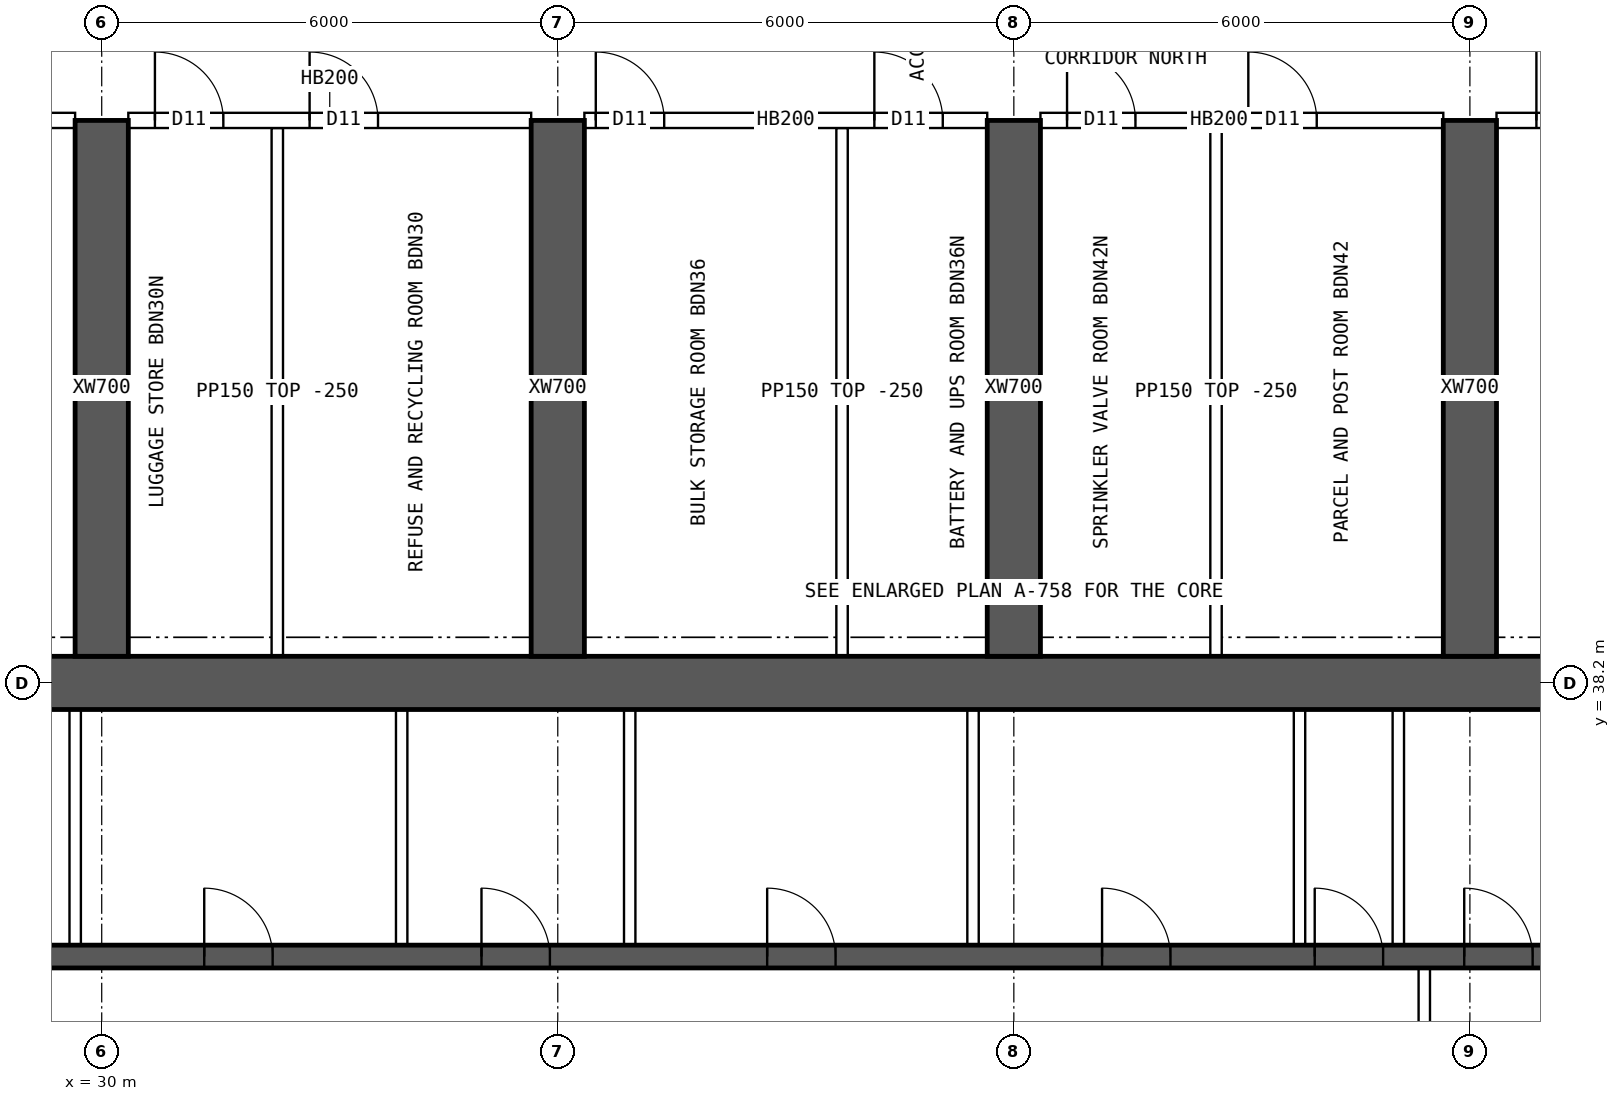
"""IFC4 building model, lengths in metres.
Left out: names, types, materials, properties, quantities, classifications, styles, units other than length and angle.
Written with IfcOpenShell. Run it as: python <this file> out.ifc"""

import sys

from ifc_helpers import new_model, si_unit, direction, frame, frame_2d, origin, place, context, subcontext, project, spatial, rectangle, extrude, element, fill, save


model = new_model("IFC4")
c1 = context("Model", 3, precision=1e-05, world=origin(), true_north=direction((0.0, 1.0)))
c2 = subcontext(c1, "Body", "Model", "MODEL_VIEW")
j1 = project(units=[si_unit("LENGTHUNIT", "METRE"), si_unit("PLANEANGLEUNIT", "RADIAN")], contexts=[c1])
p1 = place(None, origin())
s1 = spatial("IfcSite", under=j1, at=p1, CompositionType="ELEMENT")
p2 = place(p1, origin())
s2 = spatial("IfcBuilding", under=s1, at=p2, CompositionType="ELEMENT")
p3 = place(p2, frame((0.0, 0.0, 224.05)))
s3 = spatial("IfcBuildingStorey", under=s2, at=p3, CompositionType="ELEMENT", Elevation=224.05)
p4 = place(p3, frame((18.0, 38.2, 0.0), z_axis=(0.0, 0.0, 1.0), x_axis=(1.0, 0.0, 0.0)))
e1 = element("IfcWall", 1, at=p4, inside=s3, PredefinedType="SHEAR", context=c2, shape_type="SweptSolid", body=[
    extrude(rectangle(XDim=48.0, YDim=0.7, at=frame_2d((24.0, 0.0))), origin(), (0.0, 0.0, 1.0), 3.75),
])
p5 = place(p3, frame((18.35, 34.6, 0.0), z_axis=(0.0, 0.0, 1.0), x_axis=(1.0, 0.0, 0.0)))
e2 = element("IfcWall", 2, at=p5, inside=s3, PredefinedType="SHEAR", context=c2, shape_type="SweptSolid", body=[
    extrude(rectangle(XDim=47.3, YDim=0.3, at=frame_2d((23.65, 0.0))), origin(), (0.0, 0.0, 1.0), 3.75),
])
p6 = place(p5, frame((0.9, 0.0, 0.0)))
e3 = element("IfcOpeningElement", 3, at=p6, cuts=e2, PredefinedType="OPENING", context=c2, shape_type="SweptSolid", body=[
    extrude(rectangle(XDim=1.1, YDim=2.1, at=frame_2d((0.55, 1.05))), frame((0.0, 0.16, 0.0), z_axis=(0.0, -1.0, 0.0), x_axis=(1.0, 0.0, 0.0)), (0.0, 0.0, 1.0), 0.32),
])
p7 = place(p5, frame((45.3, 0.0, 0.0)))
e4 = element("IfcOpeningElement", 4, at=p7, cuts=e2, PredefinedType="OPENING", context=c2, shape_type="SweptSolid", body=[
    extrude(rectangle(XDim=1.1, YDim=2.1, at=frame_2d((0.55, 1.05))), frame((0.0, 0.16, 0.0), z_axis=(0.0, -1.0, 0.0), x_axis=(1.0, 0.0, 0.0)), (0.0, 0.0, 1.0), 0.32),
])
p8 = place(p5, frame((4.25, 0.0, 0.0)))
e5 = element("IfcOpeningElement", 5, at=p8, cuts=e2, PredefinedType="OPENING", context=c2, shape_type="SweptSolid", body=[
    extrude(rectangle(XDim=0.9, YDim=2.1, at=frame_2d((0.45, 1.05))), frame((0.0, 0.16, 0.0), z_axis=(0.0, -1.0, 0.0), x_axis=(1.0, 0.0, 0.0)), (0.0, 0.0, 1.0), 0.32),
])
p9 = place(p5, frame((42.15, 0.0, 0.0)))
e6 = element("IfcOpeningElement", 6, at=p9, cuts=e2, PredefinedType="OPENING", context=c2, shape_type="SweptSolid", body=[
    extrude(rectangle(XDim=0.9, YDim=2.1, at=frame_2d((0.45, 1.05))), frame((0.0, 0.16, 0.0), z_axis=(0.0, -1.0, 0.0), x_axis=(1.0, 0.0, 0.0)), (0.0, 0.0, 1.0), 0.32),
])
p10 = place(p5, frame((9.025, 0.0, 0.0)))
e7 = element("IfcOpeningElement", 7, at=p10, cuts=e2, PredefinedType="OPENING", context=c2, shape_type="SweptSolid", body=[
    extrude(rectangle(XDim=0.9, YDim=2.1, at=frame_2d((0.45, 1.05))), frame((0.0, 0.16, 0.0), z_axis=(0.0, -1.0, 0.0), x_axis=(1.0, 0.0, 0.0)), (0.0, 0.0, 1.0), 0.32),
])
p11 = place(p5, frame((12.999, 0.0, 0.0)))
e8 = element("IfcOpeningElement", 8, at=p11, cuts=e2, PredefinedType="OPENING", context=c2, shape_type="SweptSolid", body=[
    extrude(rectangle(XDim=0.9, YDim=2.1, at=frame_2d((0.45, 1.05))), frame((0.0, 0.16, 0.0), z_axis=(0.0, -1.0, 0.0), x_axis=(1.0, 0.0, 0.0)), (0.0, 0.0, 1.0), 0.32),
])
p12 = place(p5, frame((16.646, 0.0, 0.0)))
e9 = element("IfcOpeningElement", 9, at=p12, cuts=e2, PredefinedType="OPENING", context=c2, shape_type="SweptSolid", body=[
    extrude(rectangle(XDim=0.9, YDim=2.1, at=frame_2d((0.45, 1.05))), frame((0.0, 0.16, 0.0), z_axis=(0.0, -1.0, 0.0), x_axis=(1.0, 0.0, 0.0)), (0.0, 0.0, 1.0), 0.32),
])
p13 = place(p5, frame((20.405, 0.0, 0.0)))
e10 = element("IfcOpeningElement", 10, at=p13, cuts=e2, PredefinedType="OPENING", context=c2, shape_type="SweptSolid", body=[
    extrude(rectangle(XDim=0.9, YDim=2.1, at=frame_2d((0.45, 1.05))), frame((0.0, 0.16, 0.0), z_axis=(0.0, -1.0, 0.0), x_axis=(1.0, 0.0, 0.0)), (0.0, 0.0, 1.0), 0.32),
])
p14 = place(p5, frame((24.811, 0.0, 0.0)))
e11 = element("IfcOpeningElement", 11, at=p14, cuts=e2, PredefinedType="OPENING", context=c2, shape_type="SweptSolid", body=[
    extrude(rectangle(XDim=0.9, YDim=2.1, at=frame_2d((0.45, 1.05))), frame((0.0, 0.16, 0.0), z_axis=(0.0, -1.0, 0.0), x_axis=(1.0, 0.0, 0.0)), (0.0, 0.0, 1.0), 0.32),
])
p15 = place(p5, frame((27.608, 0.0, 0.0)))
e12 = element("IfcOpeningElement", 12, at=p15, cuts=e2, PredefinedType="OPENING", context=c2, shape_type="SweptSolid", body=[
    extrude(rectangle(XDim=0.9, YDim=2.1, at=frame_2d((0.45, 1.05))), frame((0.0, 0.16, 0.0), z_axis=(0.0, -1.0, 0.0), x_axis=(1.0, 0.0, 0.0)), (0.0, 0.0, 1.0), 0.32),
])
p16 = place(p5, frame((29.575, 0.0, 0.0)))
e13 = element("IfcOpeningElement", 13, at=p16, cuts=e2, PredefinedType="OPENING", context=c2, shape_type="SweptSolid", body=[
    extrude(rectangle(XDim=0.9, YDim=2.1, at=frame_2d((0.45, 1.05))), frame((0.0, 0.16, 0.0), z_axis=(0.0, -1.0, 0.0), x_axis=(1.0, 0.0, 0.0)), (0.0, 0.0, 1.0), 0.32),
])
p17 = place(p5, frame((32.007, 0.0, 0.0)))
e14 = element("IfcOpeningElement", 14, at=p17, cuts=e2, PredefinedType="OPENING", context=c2, shape_type="SweptSolid", body=[
    extrude(rectangle(XDim=0.9, YDim=2.1, at=frame_2d((0.45, 1.05))), frame((0.0, 0.16, 0.0), z_axis=(0.0, -1.0, 0.0), x_axis=(1.0, 0.0, 0.0)), (0.0, 0.0, 1.0), 0.32),
])
p18 = place(p5, frame((34.742, 0.0, 0.0)))
e15 = element("IfcOpeningElement", 15, at=p18, cuts=e2, PredefinedType="OPENING", context=c2, shape_type="SweptSolid", body=[
    extrude(rectangle(XDim=0.9, YDim=2.1, at=frame_2d((0.45, 1.05))), frame((0.0, 0.16, 0.0), z_axis=(0.0, -1.0, 0.0), x_axis=(1.0, 0.0, 0.0)), (0.0, 0.0, 1.0), 0.32),
])
p19 = place(p5, frame((37.781, 0.0, 0.0)))
e16 = element("IfcOpeningElement", 16, at=p19, cuts=e2, PredefinedType="OPENING", context=c2, shape_type="SweptSolid", body=[
    extrude(rectangle(XDim=0.9, YDim=2.1, at=frame_2d((0.45, 1.05))), frame((0.0, 0.16, 0.0), z_axis=(0.0, -1.0, 0.0), x_axis=(1.0, 0.0, 0.0)), (0.0, 0.0, 1.0), 0.32),
])
for number, where, z_axis, x_axis in (
    (17, (30.0, 38.55, 0.0), (0.0, 0.0, 1.0), (0.0, 1.0, 0.0)),
    (18, (36.0, 38.55, 0.0), (0.0, 0.0, 1.0), (0.0, 1.0, 0.0)),
    (19, (42.0, 38.55, 0.0), (0.0, 0.0, 1.0), (0.0, 1.0, 0.0)),
    (20, (48.0, 38.55, 0.0), (0.0, 0.0, 1.0), (0.0, 1.0, 0.0)),
):
    element("IfcWall", number, at=place(p3, frame(where, z_axis=z_axis, x_axis=x_axis)), inside=s3, PredefinedType="SHEAR", context=c2, shape_type="SweptSolid", body=[
        extrude(rectangle(XDim=7.05, YDim=0.7, at=frame_2d((3.525, 0.0))), origin(), (0.0, 0.0, 1.0), 3.75),
    ])
p20 = place(p3, frame((47.4, 30.55, 0.0), z_axis=(0.0, 0.0, 1.0), x_axis=(0.0, 1.0, 0.0)))
e21 = element("IfcWall", 21, at=p20, inside=s3, PredefinedType="SOLIDWALL", context=c2, shape_type="SweptSolid", body=[
    extrude(rectangle(XDim=3.9, YDim=0.15, at=frame_2d((1.95, 0.0))), origin(), (0.0, 0.0, 1.0), 3.5),
])
p21 = place(p20, frame((1.15, 0.0, 0.0)))
e22 = element("IfcOpeningElement", 22, at=p21, cuts=e21, PredefinedType="OPENING", context=c2, shape_type="SweptSolid", body=[
    extrude(rectangle(XDim=1.6, YDim=2.1, at=frame_2d((0.8, 1.05))), frame((0.0, 0.085, 0.0), z_axis=(0.0, -1.0, 0.0), x_axis=(1.0, 0.0, 0.0)), (0.0, 0.0, 1.0), 0.17),
])
for number, where, z_axis, x_axis in (
    (23, (29.651, 34.75, 0.0), (0.0, 0.0, 1.0), (0.0, 1.0, 0.0)),
    (24, (33.946, 34.75, 0.0), (0.0, 0.0, 1.0), (0.0, 1.0, 0.0)),
    (25, (36.946, 34.75, 0.0), (0.0, 0.0, 1.0), (0.0, 1.0, 0.0)),
    (26, (41.463, 34.75, 0.0), (0.0, 0.0, 1.0), (0.0, 1.0, 0.0)),
    (27, (45.758, 34.75, 0.0), (0.0, 0.0, 1.0), (0.0, 1.0, 0.0)),
    (28, (47.058, 34.75, 0.0), (0.0, 0.0, 1.0), (0.0, 1.0, 0.0)),
):
    element("IfcWall", number, at=place(p3, frame(where, z_axis=z_axis, x_axis=x_axis)), inside=s3, PredefinedType="SOLIDWALL", context=c2, shape_type="SweptSolid", body=[
        extrude(rectangle(XDim=3.1, YDim=0.15, at=frame_2d((1.55, 0.0))), origin(), (0.0, 0.0, 1.0), 3.5),
    ])
p22 = place(p3, frame((24.35, 45.6, 0.0), z_axis=(0.0, 0.0, 1.0), x_axis=(1.0, 0.0, 0.0)))
e29 = element("IfcWall", 29, at=p22, inside=s3, PredefinedType="SOLIDWALL", context=c2, shape_type="SweptSolid", body=[
    extrude(rectangle(XDim=5.3, YDim=0.2, at=frame_2d((2.65, 0.0))), origin(), (0.0, 0.0, 1.0), 3.5),
])
p23 = place(p22, frame((0.525, 0.0, 0.0)))
e30 = element("IfcOpeningElement", 30, at=p23, cuts=e29, PredefinedType="OPENING", context=c2, shape_type="SweptSolid", body=[
    extrude(rectangle(XDim=1.0, YDim=2.1, at=frame_2d((0.5, 1.05))), frame((0.0, 0.11, 0.0), z_axis=(0.0, -1.0, 0.0), x_axis=(1.0, 0.0, 0.0)), (0.0, 0.0, 1.0), 0.22),
])
p24 = place(p3, frame((30.35, 45.6, 0.0), z_axis=(0.0, 0.0, 1.0), x_axis=(1.0, 0.0, 0.0)))
e31 = element("IfcWall", 31, at=p24, inside=s3, PredefinedType="SOLIDWALL", context=c2, shape_type="SweptSolid", body=[
    extrude(rectangle(XDim=5.3, YDim=0.2, at=frame_2d((2.65, 0.0))), origin(), (0.0, 0.0, 1.0), 3.5),
])
p25 = place(p24, frame((0.35, 0.0, 0.0)))
e32 = element("IfcOpeningElement", 32, at=p25, cuts=e31, PredefinedType="OPENING", context=c2, shape_type="SweptSolid", body=[
    extrude(rectangle(XDim=0.9, YDim=2.1, at=frame_2d((0.45, 1.05))), frame((0.0, 0.11, 0.0), z_axis=(0.0, -1.0, 0.0), x_axis=(1.0, 0.0, 0.0)), (0.0, 0.0, 1.0), 0.22),
])
p26 = place(p24, frame((2.385, 0.0, 0.0)))
e33 = element("IfcOpeningElement", 33, at=p26, cuts=e31, PredefinedType="OPENING", context=c2, shape_type="SweptSolid", body=[
    extrude(rectangle(XDim=0.9, YDim=2.1, at=frame_2d((0.45, 1.05))), frame((0.0, 0.11, 0.0), z_axis=(0.0, -1.0, 0.0), x_axis=(1.0, 0.0, 0.0)), (0.0, 0.0, 1.0), 0.22),
])
p27 = place(p3, frame((36.35, 45.6, 0.0), z_axis=(0.0, 0.0, 1.0), x_axis=(1.0, 0.0, 0.0)))
e34 = element("IfcWall", 34, at=p27, inside=s3, PredefinedType="SOLIDWALL", context=c2, shape_type="SweptSolid", body=[
    extrude(rectangle(XDim=5.3, YDim=0.2, at=frame_2d((2.65, 0.0))), origin(), (0.0, 0.0, 1.0), 3.5),
])
p28 = place(p27, frame((0.15, 0.0, 0.0)))
e35 = element("IfcOpeningElement", 35, at=p28, cuts=e34, PredefinedType="OPENING", context=c2, shape_type="SweptSolid", body=[
    extrude(rectangle(XDim=0.9, YDim=2.1, at=frame_2d((0.45, 1.05))), frame((0.0, 0.11, 0.0), z_axis=(0.0, -1.0, 0.0), x_axis=(1.0, 0.0, 0.0)), (0.0, 0.0, 1.0), 0.22),
])
p29 = place(p27, frame((3.815, 0.0, 0.0)))
e36 = element("IfcOpeningElement", 36, at=p29, cuts=e34, PredefinedType="OPENING", context=c2, shape_type="SweptSolid", body=[
    extrude(rectangle(XDim=0.9, YDim=2.1, at=frame_2d((0.45, 1.05))), frame((0.0, 0.11, 0.0), z_axis=(0.0, -1.0, 0.0), x_axis=(1.0, 0.0, 0.0)), (0.0, 0.0, 1.0), 0.22),
])
p30 = place(p3, frame((42.35, 45.6, 0.0), z_axis=(0.0, 0.0, 1.0), x_axis=(1.0, 0.0, 0.0)))
e37 = element("IfcWall", 37, at=p30, inside=s3, PredefinedType="SOLIDWALL", context=c2, shape_type="SweptSolid", body=[
    extrude(rectangle(XDim=5.3, YDim=0.2, at=frame_2d((2.65, 0.0))), origin(), (0.0, 0.0, 1.0), 3.5),
])
p31 = place(p30, frame((0.35, 0.0, 0.0)))
e38 = element("IfcOpeningElement", 38, at=p31, cuts=e37, PredefinedType="OPENING", context=c2, shape_type="SweptSolid", body=[
    extrude(rectangle(XDim=0.9, YDim=2.1, at=frame_2d((0.45, 1.05))), frame((0.0, 0.11, 0.0), z_axis=(0.0, -1.0, 0.0), x_axis=(1.0, 0.0, 0.0)), (0.0, 0.0, 1.0), 0.22),
])
p32 = place(p30, frame((2.735, 0.0, 0.0)))
e39 = element("IfcOpeningElement", 39, at=p32, cuts=e37, PredefinedType="OPENING", context=c2, shape_type="SweptSolid", body=[
    extrude(rectangle(XDim=0.9, YDim=2.1, at=frame_2d((0.45, 1.05))), frame((0.0, 0.11, 0.0), z_axis=(0.0, -1.0, 0.0), x_axis=(1.0, 0.0, 0.0)), (0.0, 0.0, 1.0), 0.22),
])
p33 = place(p3, frame((48.35, 45.6, 0.0), z_axis=(0.0, 0.0, 1.0), x_axis=(1.0, 0.0, 0.0)))
e40 = element("IfcWall", 40, at=p33, inside=s3, PredefinedType="SOLIDWALL", context=c2, shape_type="SweptSolid", body=[
    extrude(rectangle(XDim=5.3, YDim=0.2, at=frame_2d((2.65, 0.0))), origin(), (0.0, 0.0, 1.0), 3.5),
])
p34 = place(p33, frame((0.525, 0.0, 0.0)))
e41 = element("IfcOpeningElement", 41, at=p34, cuts=e40, PredefinedType="OPENING", context=c2, shape_type="SweptSolid", body=[
    extrude(rectangle(XDim=1.0, YDim=2.1, at=frame_2d((0.5, 1.05))), frame((0.0, 0.11, 0.0), z_axis=(0.0, -1.0, 0.0), x_axis=(1.0, 0.0, 0.0)), (0.0, 0.0, 1.0), 0.22),
])
for number, where, z_axis, x_axis in (
    (42, (32.31, 38.55, 0.0), (0.0, 0.0, 1.0), (0.0, 1.0, 0.0)),
    (43, (39.74, 38.55, 0.0), (0.0, 0.0, 1.0), (0.0, 1.0, 0.0)),
    (44, (44.66, 38.55, 0.0), (0.0, 0.0, 1.0), (0.0, 1.0, 0.0)),
):
    element("IfcWall", number, at=place(p3, frame(where, z_axis=z_axis, x_axis=x_axis)), inside=s3, PredefinedType="PARTITIONING", context=c2, shape_type="SweptSolid", body=[
        extrude(rectangle(XDim=6.95, YDim=0.15, at=frame_2d((3.475, 0.0))), origin(), (0.0, 0.0, 1.0), 3.5),
    ])
p35 = place(p11, origin())
e45 = element("IfcDoor", 45, at=p35, inside=s3, OperationType="SINGLE_SWING_LEFT", PredefinedType="DOOR", context=c2, shape_type="SweptSolid", body=[
    extrude(rectangle(XDim=0.9, YDim=2.1, at=frame_2d((0.45, 1.05))), frame((0.0, 0.025, 0.0), z_axis=(0.0, -1.0, 0.0), x_axis=(1.0, 0.0, 0.0)), (0.0, 0.0, 1.0), 0.05),
])
fill(e8, e45)
p36 = place(p12, origin())
e46 = element("IfcDoor", 46, at=p36, inside=s3, OperationType="SINGLE_SWING_LEFT", PredefinedType="DOOR", context=c2, shape_type="SweptSolid", body=[
    extrude(rectangle(XDim=0.9, YDim=2.1, at=frame_2d((0.45, 1.05))), frame((0.0, 0.025, 0.0), z_axis=(0.0, -1.0, 0.0), x_axis=(1.0, 0.0, 0.0)), (0.0, 0.0, 1.0), 0.05),
])
fill(e9, e46)
p37 = place(p13, origin())
e47 = element("IfcDoor", 47, at=p37, inside=s3, OperationType="SINGLE_SWING_LEFT", PredefinedType="DOOR", context=c2, shape_type="SweptSolid", body=[
    extrude(rectangle(XDim=0.9, YDim=2.1, at=frame_2d((0.45, 1.05))), frame((0.0, 0.025, 0.0), z_axis=(0.0, -1.0, 0.0), x_axis=(1.0, 0.0, 0.0)), (0.0, 0.0, 1.0), 0.05),
])
fill(e10, e47)
p38 = place(p14, origin())
e48 = element("IfcDoor", 48, at=p38, inside=s3, OperationType="SINGLE_SWING_LEFT", PredefinedType="DOOR", context=c2, shape_type="SweptSolid", body=[
    extrude(rectangle(XDim=0.9, YDim=2.1, at=frame_2d((0.45, 1.05))), frame((0.0, 0.025, 0.0), z_axis=(0.0, -1.0, 0.0), x_axis=(1.0, 0.0, 0.0)), (0.0, 0.0, 1.0), 0.05),
])
fill(e11, e48)
p39 = place(p15, origin())
e49 = element("IfcDoor", 49, at=p39, inside=s3, OperationType="SINGLE_SWING_LEFT", PredefinedType="DOOR", context=c2, shape_type="SweptSolid", body=[
    extrude(rectangle(XDim=0.9, YDim=2.1, at=frame_2d((0.45, 1.05))), frame((0.0, 0.025, 0.0), z_axis=(0.0, -1.0, 0.0), x_axis=(1.0, 0.0, 0.0)), (0.0, 0.0, 1.0), 0.05),
])
fill(e12, e49)
p40 = place(p16, origin())
e50 = element("IfcDoor", 50, at=p40, inside=s3, OperationType="SINGLE_SWING_LEFT", PredefinedType="DOOR", context=c2, shape_type="SweptSolid", body=[
    extrude(rectangle(XDim=0.9, YDim=2.1, at=frame_2d((0.45, 1.05))), frame((0.0, 0.025, 0.0), z_axis=(0.0, -1.0, 0.0), x_axis=(1.0, 0.0, 0.0)), (0.0, 0.0, 1.0), 0.05),
])
fill(e13, e50)
p41 = place(p25, origin())
e51 = element("IfcDoor", 51, at=p41, inside=s3, OperationType="SINGLE_SWING_LEFT", PredefinedType="DOOR", context=c2, shape_type="SweptSolid", body=[
    extrude(rectangle(XDim=0.9, YDim=2.1, at=frame_2d((0.45, 1.05))), frame((0.0, 0.025, 0.0), z_axis=(0.0, -1.0, 0.0), x_axis=(1.0, 0.0, 0.0)), (0.0, 0.0, 1.0), 0.05),
])
fill(e32, e51)
p42 = place(p26, origin())
e52 = element("IfcDoor", 52, at=p42, inside=s3, OperationType="SINGLE_SWING_LEFT", PredefinedType="DOOR", context=c2, shape_type="SweptSolid", body=[
    extrude(rectangle(XDim=0.9, YDim=2.1, at=frame_2d((0.45, 1.05))), frame((0.0, 0.025, 0.0), z_axis=(0.0, -1.0, 0.0), x_axis=(1.0, 0.0, 0.0)), (0.0, 0.0, 1.0), 0.05),
])
fill(e33, e52)
p43 = place(p28, origin())
e53 = element("IfcDoor", 53, at=p43, inside=s3, OperationType="SINGLE_SWING_LEFT", PredefinedType="DOOR", context=c2, shape_type="SweptSolid", body=[
    extrude(rectangle(XDim=0.9, YDim=2.1, at=frame_2d((0.45, 1.05))), frame((0.0, 0.025, 0.0), z_axis=(0.0, -1.0, 0.0), x_axis=(1.0, 0.0, 0.0)), (0.0, 0.0, 1.0), 0.05),
])
fill(e35, e53)
p44 = place(p29, origin())
e54 = element("IfcDoor", 54, at=p44, inside=s3, OperationType="SINGLE_SWING_LEFT", PredefinedType="DOOR", context=c2, shape_type="SweptSolid", body=[
    extrude(rectangle(XDim=0.9, YDim=2.1, at=frame_2d((0.45, 1.05))), frame((0.0, 0.025, 0.0), z_axis=(0.0, -1.0, 0.0), x_axis=(1.0, 0.0, 0.0)), (0.0, 0.0, 1.0), 0.05),
])
fill(e36, e54)
p45 = place(p31, origin())
e55 = element("IfcDoor", 55, at=p45, inside=s3, OperationType="SINGLE_SWING_LEFT", PredefinedType="DOOR", context=c2, shape_type="SweptSolid", body=[
    extrude(rectangle(XDim=0.9, YDim=2.1, at=frame_2d((0.45, 1.05))), frame((0.0, 0.025, 0.0), z_axis=(0.0, -1.0, 0.0), x_axis=(1.0, 0.0, 0.0)), (0.0, 0.0, 1.0), 0.05),
])
fill(e38, e55)
p46 = place(p32, origin())
e56 = element("IfcDoor", 56, at=p46, inside=s3, OperationType="SINGLE_SWING_LEFT", PredefinedType="DOOR", context=c2, shape_type="SweptSolid", body=[
    extrude(rectangle(XDim=0.9, YDim=2.1, at=frame_2d((0.45, 1.05))), frame((0.0, 0.025, 0.0), z_axis=(0.0, -1.0, 0.0), x_axis=(1.0, 0.0, 0.0)), (0.0, 0.0, 1.0), 0.05),
])
fill(e39, e56)
p47 = place(p34, origin())
e57 = element("IfcDoor", 57, at=p47, inside=s3, OperationType="SINGLE_SWING_LEFT", PredefinedType="DOOR", context=c2, shape_type="SweptSolid", body=[
    extrude(rectangle(XDim=1.0, YDim=2.1, at=frame_2d((0.5, 1.05))), frame((0.0, 0.025, 0.0), z_axis=(0.0, -1.0, 0.0), x_axis=(1.0, 0.0, 0.0)), (0.0, 0.0, 1.0), 0.05),
])
fill(e41, e57)
save(model, sys.argv[1])
